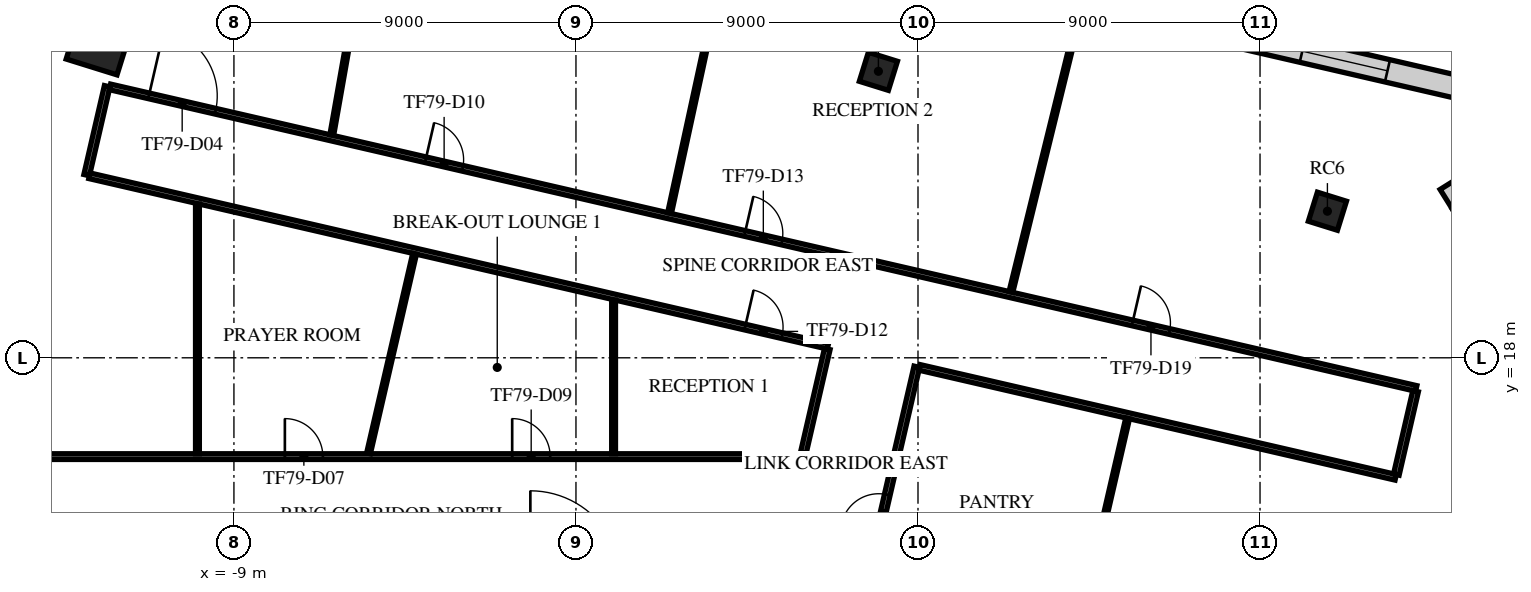
"""IFC4 building model, lengths in metres.
Left out: names, types, materials, properties, quantities, classifications, styles, units other than length and angle.
Written with IfcOpenShell. Run it as: python <this file> out.ifc"""

import sys

from ifc_helpers import new_model, si_unit, direction, frame, frame_2d, origin, origin_2d, place, context, subcontext, project, spatial, rectangle, extrude, element, fill, save


model = new_model("IFC4")
c1 = context("Model", 3, precision=1e-05, world=origin(), true_north=direction((0.0, 1.0)))
c2 = subcontext(c1, "Body", "Model", "MODEL_VIEW")
j1 = project(units=[si_unit("LENGTHUNIT", "METRE"), si_unit("PLANEANGLEUNIT", "RADIAN")], contexts=[c1])
p1 = place(None, origin())
s1 = spatial("IfcSite", under=j1, at=p1, CompositionType="ELEMENT")
p2 = place(p1, origin())
s2 = spatial("IfcBuilding", under=s1, at=p2, CompositionType="ELEMENT")
p3 = place(p2, frame((0.0, 0.0, 332.5)))
s3 = spatial("IfcBuildingStorey", under=s2, at=p3, CompositionType="ELEMENT", Elevation=332.5)
p4 = place(p3, frame((-12.537, 26.322, 0.0), z_axis=(0.0, 0.0, 1.0), x_axis=(0.297503182032, 0.954720826567, 0.0)))
e1 = element("IfcColumn", 1, at=p4, inside=s3, PredefinedType="COLUMN", context=c2, shape_type="SweptSolid", body=[
    extrude(rectangle(XDim=1.4, YDim=1.4, at=origin_2d()), origin(), (0.0, 0.0, 1.0), 4.0),
])
for number, where, z_axis, x_axis in (
    (2, (19.773, 21.857, 0.0), (0.0, 0.0, 1.0), (0.298, 0.955, 0.0)),
    (3, (7.958, 25.539, 0.0), (0.0, 0.0, 1.0), (0.298, 0.955, 0.0)),
):
    element("IfcColumn", number, at=place(p3, frame(where, z_axis=z_axis, x_axis=x_axis)), inside=s3, PredefinedType="COLUMN", context=c2, shape_type="SweptSolid", body=[
        extrude(rectangle(XDim=0.8, YDim=0.8, at=origin_2d()), origin(), (0.0, 0.0, 1.0), 4.0),
    ])
p5 = place(p3, frame((20.619, -29.381, 0.0), z_axis=(0.0, 0.0, 1.0), x_axis=(0.224952041908, 0.974369836788, 0.0)))
e4 = element("IfcWall", 4, at=p5, inside=s3, PredefinedType="STANDARD", context=c2, shape_type="SweptSolid", body=[
    extrude(rectangle(XDim=47.979, YDim=0.6, at=frame_2d((23.99, 0.0))), origin(), (0.0, 0.0, 1.0), 3.65),
])
p6 = place(p5, frame((1.231, 0.0, 0.9)))
e5 = element("IfcOpeningElement", 5, at=p6, cuts=e4, PredefinedType="OPENING", context=c2, shape_type="SweptSolid", body=[
    extrude(rectangle(XDim=1.9, YDim=2.1, at=frame_2d((0.95, 1.05))), frame((0.0, 0.31, 0.0), z_axis=(0.0, -1.0, 0.0), x_axis=(1.0, 0.0, 0.0)), (0.0, 0.0, 1.0), 0.62),
])
p7 = place(p5, frame((5.593, 0.0, 0.9)))
e6 = element("IfcOpeningElement", 6, at=p7, cuts=e4, PredefinedType="OPENING", context=c2, shape_type="SweptSolid", body=[
    extrude(rectangle(XDim=1.9, YDim=2.1, at=frame_2d((0.95, 1.05))), frame((0.0, 0.31, 0.0), z_axis=(0.0, -1.0, 0.0), x_axis=(1.0, 0.0, 0.0)), (0.0, 0.0, 1.0), 0.62),
])
p8 = place(p5, frame((9.954, 0.0, 0.9)))
e7 = element("IfcOpeningElement", 7, at=p8, cuts=e4, PredefinedType="OPENING", context=c2, shape_type="SweptSolid", body=[
    extrude(rectangle(XDim=1.9, YDim=2.1, at=frame_2d((0.95, 1.05))), frame((0.0, 0.31, 0.0), z_axis=(0.0, -1.0, 0.0), x_axis=(1.0, 0.0, 0.0)), (0.0, 0.0, 1.0), 0.62),
])
p9 = place(p5, frame((14.316, 0.0, 0.9)))
e8 = element("IfcOpeningElement", 8, at=p9, cuts=e4, PredefinedType="OPENING", context=c2, shape_type="SweptSolid", body=[
    extrude(rectangle(XDim=1.9, YDim=2.1, at=frame_2d((0.95, 1.05))), frame((0.0, 0.31, 0.0), z_axis=(0.0, -1.0, 0.0), x_axis=(1.0, 0.0, 0.0)), (0.0, 0.0, 1.0), 0.62),
])
p10 = place(p5, frame((18.678, 0.0, 0.9)))
e9 = element("IfcOpeningElement", 9, at=p10, cuts=e4, PredefinedType="OPENING", context=c2, shape_type="SweptSolid", body=[
    extrude(rectangle(XDim=1.9, YDim=2.1, at=frame_2d((0.95, 1.05))), frame((0.0, 0.31, 0.0), z_axis=(0.0, -1.0, 0.0), x_axis=(1.0, 0.0, 0.0)), (0.0, 0.0, 1.0), 0.62),
])
p11 = place(p5, frame((23.04, 0.0, 0.9)))
e10 = element("IfcOpeningElement", 10, at=p11, cuts=e4, PredefinedType="OPENING", context=c2, shape_type="SweptSolid", body=[
    extrude(rectangle(XDim=1.9, YDim=2.1, at=frame_2d((0.95, 1.05))), frame((0.0, 0.31, 0.0), z_axis=(0.0, -1.0, 0.0), x_axis=(1.0, 0.0, 0.0)), (0.0, 0.0, 1.0), 0.62),
])
p12 = place(p5, frame((27.401, 0.0, 0.9)))
e11 = element("IfcOpeningElement", 11, at=p12, cuts=e4, PredefinedType="OPENING", context=c2, shape_type="SweptSolid", body=[
    extrude(rectangle(XDim=1.9, YDim=2.1, at=frame_2d((0.95, 1.05))), frame((0.0, 0.31, 0.0), z_axis=(0.0, -1.0, 0.0), x_axis=(1.0, 0.0, 0.0)), (0.0, 0.0, 1.0), 0.62),
])
p13 = place(p5, frame((31.763, 0.0, 0.9)))
e12 = element("IfcOpeningElement", 12, at=p13, cuts=e4, PredefinedType="OPENING", context=c2, shape_type="SweptSolid", body=[
    extrude(rectangle(XDim=1.9, YDim=2.1, at=frame_2d((0.95, 1.05))), frame((0.0, 0.31, 0.0), z_axis=(0.0, -1.0, 0.0), x_axis=(1.0, 0.0, 0.0)), (0.0, 0.0, 1.0), 0.62),
])
p14 = place(p5, frame((36.125, 0.0, 0.9)))
e13 = element("IfcOpeningElement", 13, at=p14, cuts=e4, PredefinedType="OPENING", context=c2, shape_type="SweptSolid", body=[
    extrude(rectangle(XDim=1.9, YDim=2.1, at=frame_2d((0.95, 1.05))), frame((0.0, 0.31, 0.0), z_axis=(0.0, -1.0, 0.0), x_axis=(1.0, 0.0, 0.0)), (0.0, 0.0, 1.0), 0.62),
])
p15 = place(p5, frame((40.487, 0.0, 0.9)))
e14 = element("IfcOpeningElement", 14, at=p15, cuts=e4, PredefinedType="OPENING", context=c2, shape_type="SweptSolid", body=[
    extrude(rectangle(XDim=1.9, YDim=2.1, at=frame_2d((0.95, 1.05))), frame((0.0, 0.31, 0.0), z_axis=(0.0, -1.0, 0.0), x_axis=(1.0, 0.0, 0.0)), (0.0, 0.0, 1.0), 0.62),
])
p16 = place(p5, frame((44.848, 0.0, 0.9)))
e15 = element("IfcOpeningElement", 15, at=p16, cuts=e4, PredefinedType="OPENING", context=c2, shape_type="SweptSolid", body=[
    extrude(rectangle(XDim=1.9, YDim=2.1, at=frame_2d((0.95, 1.05))), frame((0.0, 0.31, 0.0), z_axis=(0.0, -1.0, 0.0), x_axis=(1.0, 0.0, 0.0)), (0.0, 0.0, 1.0), 0.62),
])
p17 = place(p3, frame((22.898, 22.175, 0.0), z_axis=(0.0, 0.0, 1.0), x_axis=(0.848040410856, 0.529931563086, 0.0)))
e16 = element("IfcWall", 16, at=p17, inside=s3, PredefinedType="STANDARD", context=c2, shape_type="SweptSolid", body=[
    extrude(rectangle(XDim=4.886, YDim=0.6, at=frame_2d((2.443, 0.0))), origin(), (0.0, 0.0, 1.0), 3.65),
])
p18 = place(p17, frame((1.843, 0.0, 0.9)))
e17 = element("IfcOpeningElement", 17, at=p18, cuts=e16, PredefinedType="OPENING", context=c2, shape_type="SweptSolid", body=[
    extrude(rectangle(XDim=1.8, YDim=2.1, at=frame_2d((0.9, 1.05))), frame((0.0, 0.31, 0.0), z_axis=(0.0, -1.0, 0.0), x_axis=(1.0, 0.0, 0.0)), (0.0, 0.0, 1.0), 0.62),
])
p19 = place(p3, frame((27.133, 24.217, 0.0), z_axis=(0.0, 0.0, 1.0), x_axis=(-0.974371242637, 0.224945952446, 0.0)))
e18 = element("IfcWall", 18, at=p19, inside=s3, PredefinedType="STANDARD", context=c2, shape_type="SweptSolid", body=[
    extrude(rectangle(XDim=42.49, YDim=0.6, at=frame_2d((21.245, 0.0))), origin(), (0.0, 0.0, 1.0), 3.65),
])
p20 = place(p19, frame((1.21, 0.0, 0.9)))
e19 = element("IfcOpeningElement", 19, at=p20, cuts=e18, PredefinedType="OPENING", context=c2, shape_type="SweptSolid", body=[
    extrude(rectangle(XDim=2.3, YDim=2.1, at=frame_2d((1.15, 1.05))), frame((0.0, 0.31, 0.0), z_axis=(0.0, -1.0, 0.0), x_axis=(1.0, 0.0, 0.0)), (0.0, 0.0, 1.0), 0.62),
])
p21 = place(p19, frame((5.932, 0.0, 0.9)))
e20 = element("IfcOpeningElement", 20, at=p21, cuts=e18, PredefinedType="OPENING", context=c2, shape_type="SweptSolid", body=[
    extrude(rectangle(XDim=2.3, YDim=2.1, at=frame_2d((1.15, 1.05))), frame((0.0, 0.31, 0.0), z_axis=(0.0, -1.0, 0.0), x_axis=(1.0, 0.0, 0.0)), (0.0, 0.0, 1.0), 0.62),
])
p22 = place(p19, frame((10.653, 0.0, 0.9)))
e21 = element("IfcOpeningElement", 21, at=p22, cuts=e18, PredefinedType="OPENING", context=c2, shape_type="SweptSolid", body=[
    extrude(rectangle(XDim=2.3, YDim=2.1, at=frame_2d((1.15, 1.05))), frame((0.0, 0.31, 0.0), z_axis=(0.0, -1.0, 0.0), x_axis=(1.0, 0.0, 0.0)), (0.0, 0.0, 1.0), 0.62),
])
p23 = place(p19, frame((15.374, 0.0, 0.9)))
e22 = element("IfcOpeningElement", 22, at=p23, cuts=e18, PredefinedType="OPENING", context=c2, shape_type="SweptSolid", body=[
    extrude(rectangle(XDim=2.3, YDim=2.1, at=frame_2d((1.15, 1.05))), frame((0.0, 0.31, 0.0), z_axis=(0.0, -1.0, 0.0), x_axis=(1.0, 0.0, 0.0)), (0.0, 0.0, 1.0), 0.62),
])
p24 = place(p19, frame((20.095, 0.0, 0.9)))
e23 = element("IfcOpeningElement", 23, at=p24, cuts=e18, PredefinedType="OPENING", context=c2, shape_type="SweptSolid", body=[
    extrude(rectangle(XDim=2.3, YDim=2.1, at=frame_2d((1.15, 1.05))), frame((0.0, 0.31, 0.0), z_axis=(0.0, -1.0, 0.0), x_axis=(1.0, 0.0, 0.0)), (0.0, 0.0, 1.0), 0.62),
])
p25 = place(p19, frame((24.816, 0.0, 0.9)))
e24 = element("IfcOpeningElement", 24, at=p25, cuts=e18, PredefinedType="OPENING", context=c2, shape_type="SweptSolid", body=[
    extrude(rectangle(XDim=2.3, YDim=2.1, at=frame_2d((1.15, 1.05))), frame((0.0, 0.31, 0.0), z_axis=(0.0, -1.0, 0.0), x_axis=(1.0, 0.0, 0.0)), (0.0, 0.0, 1.0), 0.62),
])
p26 = place(p19, frame((29.537, 0.0, 0.9)))
e25 = element("IfcOpeningElement", 25, at=p26, cuts=e18, PredefinedType="OPENING", context=c2, shape_type="SweptSolid", body=[
    extrude(rectangle(XDim=2.3, YDim=2.1, at=frame_2d((1.15, 1.05))), frame((0.0, 0.31, 0.0), z_axis=(0.0, -1.0, 0.0), x_axis=(1.0, 0.0, 0.0)), (0.0, 0.0, 1.0), 0.62),
])
p27 = place(p19, frame((34.258, 0.0, 0.9)))
e26 = element("IfcOpeningElement", 26, at=p27, cuts=e18, PredefinedType="OPENING", context=c2, shape_type="SweptSolid", body=[
    extrude(rectangle(XDim=2.3, YDim=2.1, at=frame_2d((1.15, 1.05))), frame((0.0, 0.31, 0.0), z_axis=(0.0, -1.0, 0.0), x_axis=(1.0, 0.0, 0.0)), (0.0, 0.0, 1.0), 0.62),
])
p28 = place(p19, frame((38.979, 0.0, 0.9)))
e27 = element("IfcOpeningElement", 27, at=p28, cuts=e18, PredefinedType="OPENING", context=c2, shape_type="SweptSolid", body=[
    extrude(rectangle(XDim=2.3, YDim=2.1, at=frame_2d((1.15, 1.05))), frame((0.0, 0.31, 0.0), z_axis=(0.0, -1.0, 0.0), x_axis=(1.0, 0.0, 0.0)), (0.0, 0.0, 1.0), 0.62),
])
p29 = place(p3, frame((-15.325, 15.4, 0.0), z_axis=(0.0, 0.0, 1.0), x_axis=(1.0, 0.0, 0.0)))
e28 = element("IfcWall", 28, at=p29, inside=s3, PredefinedType="PARTITIONING", context=c2, shape_type="SweptSolid", body=[
    extrude(rectangle(XDim=21.285, YDim=0.15, at=frame_2d((10.643, 0.0))), origin(), (0.0, 0.0, 1.0), 3.25),
])
p30 = place(p29, frame((7.665, 0.0, 0.0)))
e29 = element("IfcOpeningElement", 29, at=p30, cuts=e28, PredefinedType="OPENING", context=c2, shape_type="SweptSolid", body=[
    extrude(rectangle(XDim=1.0, YDim=2.1, at=frame_2d((0.5, 1.05))), frame((0.0, 0.085, 0.0), z_axis=(0.0, -1.0, 0.0), x_axis=(1.0, 0.0, 0.0)), (0.0, 0.0, 1.0), 0.17),
])
p31 = place(p29, frame((13.647, 0.0, 0.0)))
e30 = element("IfcOpeningElement", 30, at=p31, cuts=e28, PredefinedType="OPENING", context=c2, shape_type="SweptSolid", body=[
    extrude(rectangle(XDim=1.0, YDim=2.1, at=frame_2d((0.5, 1.05))), frame((0.0, 0.085, 0.0), z_axis=(0.0, -1.0, 0.0), x_axis=(1.0, 0.0, 0.0)), (0.0, 0.0, 1.0), 0.17),
])
p32 = place(p3, frame((-12.875, 22.807, 0.0), z_axis=(0.0, 0.0, 1.0), x_axis=(0.224956061598, 0.974368908756, 0.0)))
e31 = element("IfcWall", 31, at=p32, inside=s3, PredefinedType="PARTITIONING", context=c2, shape_type="SweptSolid", body=[
    extrude(rectangle(XDim=2.401, YDim=0.15, at=frame_2d((1.2, 0.0))), origin(), (0.0, 0.0, 1.0), 3.13),
])
p33 = place(p3, frame((-12.802, 22.79, 0.0), z_axis=(0.0, 0.0, 1.0), x_axis=(0.974371384758, -0.224945336838, 0.0)))
e32 = element("IfcWall", 32, at=p33, inside=s3, PredefinedType="PARTITIONING", context=c2, shape_type="SweptSolid", body=[
    extrude(rectangle(XDim=19.943, YDim=0.15, at=frame_2d((9.972, 0.0))), origin(), (0.0, 0.0, 1.0), 3.25),
])
p34 = place(p33, frame((17.705, 0.0, 0.0)))
e33 = element("IfcOpeningElement", 33, at=p34, cuts=e32, PredefinedType="OPENING", context=c2, shape_type="SweptSolid", body=[
    extrude(rectangle(XDim=1.0, YDim=2.1, at=frame_2d((0.5, 1.05))), frame((0.0, 0.085, 0.0), z_axis=(0.0, -1.0, 0.0), x_axis=(1.0, 0.0, 0.0)), (0.0, 0.0, 1.0), 0.17),
])
p35 = place(p3, frame((-12.262, 25.129, 0.0), z_axis=(0.0, 0.0, 1.0), x_axis=(0.974366228137, -0.224967672045, 0.0)))
e34 = element("IfcWall", 34, at=p35, inside=s3, PredefinedType="PARTITIONING", context=c2, shape_type="SweptSolid", body=[
    extrude(rectangle(XDim=35.276, YDim=0.15, at=frame_2d((17.638, 0.0))), origin(), (0.0, 0.0, 1.0), 3.25),
])
p36 = place(p35, frame((1.05, 0.0, 0.0)))
e35 = element("IfcOpeningElement", 35, at=p36, cuts=e34, PredefinedType="OPENING", context=c2, shape_type="SweptSolid", body=[
    extrude(rectangle(XDim=1.8, YDim=2.1, at=frame_2d((0.9, 1.05))), frame((0.0, 0.085, 0.0), z_axis=(0.0, -1.0, 0.0), x_axis=(1.0, 0.0, 0.0)), (0.0, 0.0, 1.0), 0.17),
])
p37 = place(p35, frame((8.524, 0.0, 0.0)))
e36 = element("IfcOpeningElement", 36, at=p37, cuts=e34, PredefinedType="OPENING", context=c2, shape_type="SweptSolid", body=[
    extrude(rectangle(XDim=1.0, YDim=2.1, at=frame_2d((0.5, 1.05))), frame((0.0, 0.085, 0.0), z_axis=(0.0, -1.0, 0.0), x_axis=(1.0, 0.0, 0.0)), (0.0, 0.0, 1.0), 0.17),
])
p38 = place(p35, frame((17.144, 0.0, 0.0)))
e37 = element("IfcOpeningElement", 37, at=p38, cuts=e34, PredefinedType="OPENING", context=c2, shape_type="SweptSolid", body=[
    extrude(rectangle(XDim=1.0, YDim=2.1, at=frame_2d((0.5, 1.05))), frame((0.0, 0.085, 0.0), z_axis=(0.0, -1.0, 0.0), x_axis=(1.0, 0.0, 0.0)), (0.0, 0.0, 1.0), 0.17),
])
p39 = place(p35, frame((27.613, 0.0, 0.0)))
e38 = element("IfcOpeningElement", 38, at=p39, cuts=e34, PredefinedType="OPENING", context=c2, shape_type="SweptSolid", body=[
    extrude(rectangle(XDim=1.0, YDim=2.1, at=frame_2d((0.5, 1.05))), frame((0.0, 0.085, 0.0), z_axis=(0.0, -1.0, 0.0), x_axis=(1.0, 0.0, 0.0)), (0.0, 0.0, 1.0), 0.17),
])
p40 = place(p3, frame((5.981, 15.492, 0.0), z_axis=(0.0, 0.0, 1.0), x_axis=(0.224777043794, 0.97441022192, 0.0)))
e39 = element("IfcWall", 39, at=p40, inside=s3, PredefinedType="PARTITIONING", context=c2, shape_type="SweptSolid", body=[
    extrude(rectangle(XDim=2.811, YDim=0.15, at=frame_2d((1.406, 0.0))), origin(), (0.0, 0.0, 1.0), 3.65),
])
p41 = place(p3, frame((7.731, 12.4, 0.0), z_axis=(0.0, 0.0, 1.0), x_axis=(0.224891896022, 0.974383720668, 0.0)))
e40 = element("IfcWall", 40, at=p41, inside=s3, PredefinedType="PARTITIONING", context=c2, shape_type="SweptSolid", body=[
    extrude(rectangle(XDim=5.505, YDim=0.15, at=frame_2d((2.752, 0.0))), origin(), (0.0, 0.0, 1.0), 3.13),
])
p42 = place(p41, frame((1.05, 0.0, 0.0)))
e41 = element("IfcOpeningElement", 41, at=p42, cuts=e40, PredefinedType="OPENING", context=c2, shape_type="SweptSolid", body=[
    extrude(rectangle(XDim=1.0, YDim=2.1, at=frame_2d((0.5, 1.05))), frame((0.0, 0.085, 0.0), z_axis=(0.0, -1.0, 0.0), x_axis=(1.0, 0.0, 0.0)), (0.0, 0.0, 1.0), 0.17),
])
p43 = place(p3, frame((9.042, 17.747, 0.0), z_axis=(0.0, 0.0, 1.0), x_axis=(0.974374231644, -0.224933004931, 0.0)))
e42 = element("IfcWall", 42, at=p43, inside=s3, PredefinedType="PARTITIONING", context=c2, shape_type="SweptSolid", body=[
    extrude(rectangle(XDim=12.858, YDim=0.15, at=frame_2d((6.429, 0.0))), origin(), (0.0, 0.0, 1.0), 3.25),
])
p44 = place(p3, frame((21.587, 14.928, 0.0), z_axis=(0.0, 0.0, 1.0), x_axis=(0.224978397981, 0.974363751605, 0.0)))
e43 = element("IfcWall", 43, at=p44, inside=s3, PredefinedType="PARTITIONING", context=c2, shape_type="SweptSolid", body=[
    extrude(rectangle(XDim=2.25, YDim=0.15, at=frame_2d((1.125, 0.0))), origin(), (0.0, 0.0, 1.0), 3.65),
])
p45 = place(p3, frame((-9.96, 15.475, 0.0), z_axis=(0.0, 0.0, 1.0), x_axis=(0.0, 1.0, 0.0)))
e44 = element("IfcWall", 44, at=p45, inside=s3, PredefinedType="PARTITIONING", context=c2, shape_type="SweptSolid", body=[
    extrude(rectangle(XDim=6.57, YDim=0.1, at=frame_2d((3.285, 0.0))), origin(), (0.0, 0.0, 1.0), 3.65),
])
p46 = place(p3, frame((-6.426, 23.862, 0.0), z_axis=(0.0, 0.0, 1.0), x_axis=(0.173571031003, 0.984821352935, 0.0)))
e45 = element("IfcWall", 45, at=p46, inside=s3, PredefinedType="PARTITIONING", context=c2, shape_type="SweptSolid", body=[
    extrude(rectangle(XDim=7.604, YDim=0.1, at=frame_2d((3.802, 0.0))), origin(), (0.0, 0.0, 1.0), 3.05),
])
p47 = place(p3, frame((-5.458, 15.486, 0.0), z_axis=(0.0, 0.0, 1.0), x_axis=(0.224899204936, 0.974382033711, 0.0)))
e46 = element("IfcWall", 46, at=p47, inside=s3, PredefinedType="PARTITIONING", context=c2, shape_type="SweptSolid", body=[
    extrude(rectangle(XDim=5.39, YDim=0.1, at=frame_2d((2.695, 0.0))), origin(), (0.0, 0.0, 1.0), 3.13),
])
p48 = place(p3, frame((0.99, 15.475, 0.0), z_axis=(0.0, 0.0, 1.0), x_axis=(0.0, 1.0, 0.0)))
e47 = element("IfcWall", 47, at=p48, inside=s3, PredefinedType="PARTITIONING", context=c2, shape_type="SweptSolid", body=[
    extrude(rectangle(XDim=4.042, YDim=0.1, at=frame_2d((2.021, 0.0))), origin(), (0.0, 0.0, 1.0), 3.65),
])
p49 = place(p3, frame((2.462, 21.807, 0.0), z_axis=(0.0, 0.0, 1.0), x_axis=(0.211973327183, 0.977275451735, 0.0)))
e48 = element("IfcWall", 48, at=p49, inside=s3, PredefinedType="PARTITIONING", context=c2, shape_type="SweptSolid", body=[
    extrude(rectangle(XDim=7.597, YDim=0.1, at=frame_2d((3.798, 0.0))), origin(), (0.0, 0.0, 1.0), 3.05),
])
p50 = place(p3, frame((11.445, 19.733, 0.0), z_axis=(0.0, 0.0, 1.0), x_axis=(0.238465178955, 0.971151048203, 0.0)))
e49 = element("IfcWall", 49, at=p50, inside=s3, PredefinedType="PARTITIONING", context=c2, shape_type="SweptSolid", body=[
    extrude(rectangle(XDim=7.597, YDim=0.1, at=frame_2d((3.798, 0.0))), origin(), (0.0, 0.0, 1.0), 3.05),
])
p51 = place(p3, frame((13.612, 12.486, 0.0), z_axis=(0.0, 0.0, 1.0), x_axis=(0.224788589714, 0.974407558435, 0.0)))
e50 = element("IfcWall", 50, at=p51, inside=s3, PredefinedType="PARTITIONING", context=c2, shape_type="SweptSolid", body=[
    extrude(rectangle(XDim=4.023, YDim=0.1, at=frame_2d((2.011, 0.0))), origin(), (0.0, 0.0, 1.0), 3.25),
])
p52 = place(p21, origin())
e51 = element("IfcWindow", 51, at=p52, inside=s3, PartitioningType="SINGLE_PANEL", PredefinedType="WINDOW", context=c2, shape_type="SweptSolid", body=[
    extrude(rectangle(XDim=2.3, YDim=2.1, at=frame_2d((1.15, 1.05))), frame((0.0, 0.03, 0.0), z_axis=(0.0, -1.0, 0.0), x_axis=(1.0, 0.0, 0.0)), (0.0, 0.0, 1.0), 0.06),
])
fill(e20, e51)
p53 = place(p36, origin())
e52 = element("IfcDoor", 52, at=p53, inside=s3, OperationType="DOUBLE_DOOR_SINGLE_SWING", PredefinedType="DOOR", context=c2, shape_type="SweptSolid", body=[
    extrude(rectangle(XDim=1.8, YDim=2.1, at=frame_2d((0.9, 1.05))), frame((0.0, 0.025, 0.0), z_axis=(0.0, -1.0, 0.0), x_axis=(1.0, 0.0, 0.0)), (0.0, 0.0, 1.0), 0.05),
])
fill(e35, e52)
p54 = place(p30, origin())
e53 = element("IfcDoor", 53, at=p54, inside=s3, OperationType="SINGLE_SWING_LEFT", PredefinedType="DOOR", context=c2, shape_type="SweptSolid", body=[
    extrude(rectangle(XDim=1.0, YDim=2.1, at=frame_2d((0.5, 1.05))), frame((0.0, 0.025, 0.0), z_axis=(0.0, -1.0, 0.0), x_axis=(1.0, 0.0, 0.0)), (0.0, 0.0, 1.0), 0.05),
])
fill(e29, e53)
p55 = place(p31, origin())
e54 = element("IfcDoor", 54, at=p55, inside=s3, OperationType="SINGLE_SWING_RIGHT", PredefinedType="DOOR", context=c2, shape_type="SweptSolid", body=[
    extrude(rectangle(XDim=1.0, YDim=2.1, at=frame_2d((0.5, 1.05))), frame((0.0, 0.025, 0.0), z_axis=(0.0, -1.0, 0.0), x_axis=(1.0, 0.0, 0.0)), (0.0, 0.0, 1.0), 0.05),
])
fill(e30, e54)
p56 = place(p37, origin())
e55 = element("IfcDoor", 55, at=p56, inside=s3, OperationType="SINGLE_SWING_RIGHT", PredefinedType="DOOR", context=c2, shape_type="SweptSolid", body=[
    extrude(rectangle(XDim=1.0, YDim=2.1, at=frame_2d((0.5, 1.05))), frame((0.0, 0.025, 0.0), z_axis=(0.0, -1.0, 0.0), x_axis=(1.0, 0.0, 0.0)), (0.0, 0.0, 1.0), 0.05),
])
fill(e36, e55)
p57 = place(p34, frame((1.0, 0.0, 0.0), z_axis=(0.0, 0.0, 1.0), x_axis=(-1.0, 0.0, 0.0)))
e56 = element("IfcDoor", 56, at=p57, inside=s3, OperationType="SINGLE_SWING_RIGHT", PredefinedType="DOOR", context=c2, shape_type="SweptSolid", body=[
    extrude(rectangle(XDim=1.0, YDim=2.1, at=frame_2d((0.5, 1.05))), frame((0.0, 0.025, 0.0), z_axis=(0.0, -1.0, 0.0), x_axis=(1.0, 0.0, 0.0)), (0.0, 0.0, 1.0), 0.05),
])
fill(e33, e56)
p58 = place(p38, origin())
e57 = element("IfcDoor", 57, at=p58, inside=s3, OperationType="SINGLE_SWING_LEFT", PredefinedType="DOOR", context=c2, shape_type="SweptSolid", body=[
    extrude(rectangle(XDim=1.0, YDim=2.1, at=frame_2d((0.5, 1.05))), frame((0.0, 0.025, 0.0), z_axis=(0.0, -1.0, 0.0), x_axis=(1.0, 0.0, 0.0)), (0.0, 0.0, 1.0), 0.05),
])
fill(e37, e57)
p59 = place(p42, frame((1.0, 0.0, 0.0), z_axis=(0.0, 0.0, 1.0), x_axis=(-1.0, 0.0, 0.0)))
e58 = element("IfcDoor", 58, at=p59, inside=s3, OperationType="SINGLE_SWING_RIGHT", PredefinedType="DOOR", context=c2, shape_type="SweptSolid", body=[
    extrude(rectangle(XDim=1.0, YDim=2.1, at=frame_2d((0.5, 1.05))), frame((0.0, 0.025, 0.0), z_axis=(0.0, -1.0, 0.0), x_axis=(1.0, 0.0, 0.0)), (0.0, 0.0, 1.0), 0.05),
])
fill(e41, e58)
p60 = place(p39, origin())
e59 = element("IfcDoor", 59, at=p60, inside=s3, OperationType="SINGLE_SWING_LEFT", PredefinedType="DOOR", context=c2, shape_type="SweptSolid", body=[
    extrude(rectangle(XDim=1.0, YDim=2.1, at=frame_2d((0.5, 1.05))), frame((0.0, 0.025, 0.0), z_axis=(0.0, -1.0, 0.0), x_axis=(1.0, 0.0, 0.0)), (0.0, 0.0, 1.0), 0.05),
])
fill(e38, e59)
save(model, sys.argv[1])
